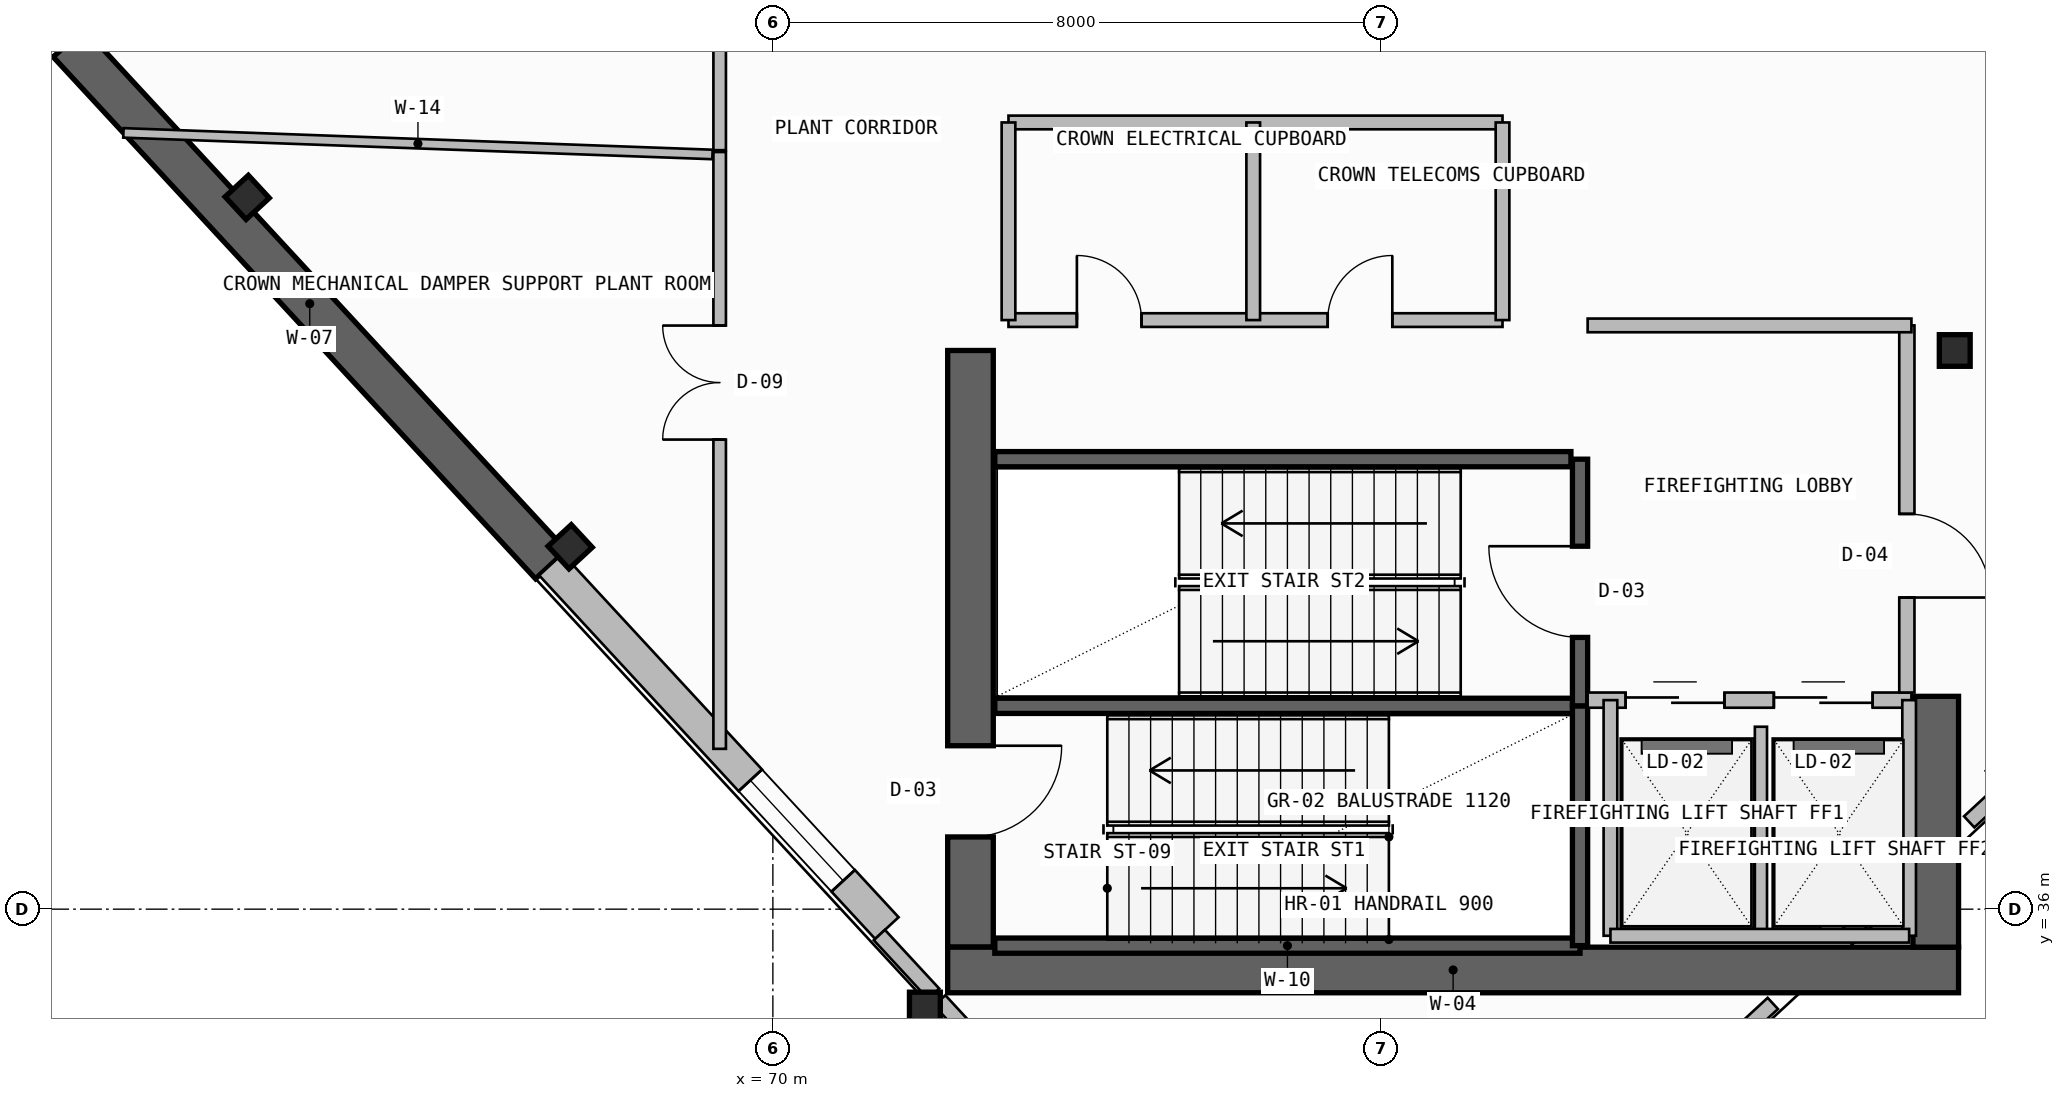
"""IFC4 building model, lengths in metres.
Left out: names, types, materials, properties, quantities, classifications, styles, units other than length and angle.
Written with IfcOpenShell. Run it as: python <this file> out.ifc"""

import sys

from ifc_helpers import new_model, si_unit, direction, frame, frame_2d, origin, origin_2d, place, context, subcontext, project, spatial, polyline, rectangle, i_section, outline, extrude, element, fill, save


model = new_model("IFC4")
c1 = context("Model", 3, precision=1e-05, world=origin(), true_north=direction((0.0, 1.0)))
c2 = subcontext(c1, "Body", "Model", "MODEL_VIEW")
j1 = project(units=[si_unit("LENGTHUNIT", "METRE"), si_unit("PLANEANGLEUNIT", "RADIAN")], contexts=[c1])
p1 = place(None, origin())
s1 = spatial("IfcSite", under=j1, at=p1, CompositionType="ELEMENT")
p2 = place(p1, origin())
s2 = spatial("IfcBuilding", under=s1, at=p2, CompositionType="ELEMENT")
p3 = place(p2, frame((0.0, 0.0, 312.58)))
s3 = spatial("IfcBuildingStorey", under=s2, at=p3, CompositionType="ELEMENT", Elevation=312.58)
p4 = place(p3, frame((72.6, 35.5, -0.2), z_axis=(0.0, 0.0, 1.0), x_axis=(0.0, 1.0, 0.0)))
e1 = element("IfcWall", 1, at=p4, inside=s3, PredefinedType="SHEAR", context=c2, shape_type="SweptSolid", body=[
    extrude(rectangle(XDim=7.85, YDim=0.6, at=frame_2d((3.925, 0.0))), origin(), (0.0, 0.0, 1.0), 4.8),
])
p5 = place(p4, frame((1.45, 0.0, 0.2)))
e2 = element("IfcOpeningElement", 2, at=p5, cuts=e1, PredefinedType="OPENING", context=c2, shape_type="SweptSolid", body=[
    extrude(rectangle(XDim=1.2, YDim=2.2, at=frame_2d((0.6, 1.1))), frame((0.0, 0.31, 0.0), z_axis=(0.0, -1.0, 0.0), x_axis=(1.0, 0.0, 0.0)), (0.0, 0.0, 1.0), 0.62),
])
p6 = place(p3, frame((72.3, 35.2, -0.2), z_axis=(0.0, 0.0, 1.0), x_axis=(1.0, 0.0, 0.0)))
e3 = element("IfcWall", 3, at=p6, inside=s3, PredefinedType="SHEAR", context=c2, shape_type="SweptSolid", body=[
    extrude(rectangle(XDim=13.3, YDim=0.6, at=frame_2d((6.65, 0.0))), origin(), (0.0, 0.0, 1.0), 4.8),
])
p7 = place(p3, frame((85.3, 35.5, -0.2), z_axis=(0.0, 0.0, 1.0), x_axis=(0.0, 1.0, 0.0)))
e4 = element("IfcWall", 4, at=p7, inside=s3, PredefinedType="SHEAR", context=c2, shape_type="SweptSolid", body=[
    extrude(rectangle(XDim=3.3, YDim=0.6, at=frame_2d((1.65, 0.0))), origin(), (0.0, 0.0, 1.0), 4.8),
])
for number, where, z_axis, x_axis in (
    (5, (72.0, 34.7, 0.0), (0.0, 0.0, 1.0), (1.0, 0.0, 0.0)),
    (6, (85.55, 43.35, 0.0), (0.0, 0.0, 1.0), (1.0, 0.0, 0.0)),
    (7, (63.084, 45.364, 0.0), (0.0, 0.0, 1.0), (-0.679, 0.734, 0.0)),
    (8, (67.333, 40.768, 0.0), (0.0, 0.0, 1.0), (-0.679, 0.734, 0.0)),
):
    element("IfcColumn", number, at=place(p3, frame(where, z_axis=z_axis, x_axis=x_axis)), inside=s3, PredefinedType="COLUMN", context=c2, shape_type="SweptSolid", body=[
        extrude(i_section(OverallWidth=0.406, OverallDepth=0.416, WebThickness=0.03, FlangeThickness=0.048, FilletRadius=0.015, at=origin_2d()), origin(), (0.0, 0.0, 1.0), 4.8),
    ])
p8 = place(p3, frame((54.805, 53.812, -0.2), z_axis=(0.0, 0.0, 1.0), x_axis=(0.678803115619, -0.734320318543, 0.0)))
e9 = element("IfcWall", 9, at=p8, inside=s3, PredefinedType="SHEAR", context=c2, shape_type="SweptSolid", body=[
    extrude(outline(polyline([(0.0, 0.0), (18.083, 0.0), (18.083, 4.8), (0.0, 3.755), (0.0, 0.0)])), frame((0.0, 0.275, 0.0), z_axis=(0.0, -1.0, 0.0), x_axis=(1.0, 0.0, 0.0)), (0.0, 0.0, 1.0), 0.55),
])
p9 = place(p8, frame((6.934, 0.0, 0.7)))
e10 = element("IfcOpeningElement", 10, at=p9, cuts=e9, PredefinedType="OPENING", context=c2, shape_type="SweptSolid", body=[
    extrude(rectangle(XDim=1.8, YDim=1.2, at=frame_2d((0.9, 0.6))), frame((0.0, 0.285, 0.0), z_axis=(0.0, -1.0, 0.0), x_axis=(1.0, 0.0, 0.0)), (0.0, 0.0, 1.0), 0.57),
])
p10 = place(p3, frame((67.08, 40.533, 0.0), z_axis=(0.0, 0.0, 1.0), x_axis=(0.678800006437, -0.734323192648, 0.0)))
e11 = element("IfcWall", 11, at=p10, inside=s3, PredefinedType="SOLIDWALL", context=c2, shape_type="SweptSolid", body=[
    extrude(outline(polyline([(0.0, 0.0), (6.512, 0.0), (6.512, 4.6), (0.0, 4.6), (0.0, 0.0)])), frame((0.0, 0.21, 0.0), z_axis=(0.0, -1.0, 0.0), x_axis=(1.0, 0.0, 0.0)), (0.0, 0.0, 1.0), 0.42),
])
p11 = place(p10, frame((3.865, 0.0, 0.7)))
e12 = element("IfcOpeningElement", 12, at=p11, cuts=e11, PredefinedType="OPENING", context=c2, shape_type="SweptSolid", body=[
    extrude(rectangle(XDim=1.8, YDim=1.2, at=frame_2d((0.9, 0.6))), frame((0.0, 0.22, 0.0), z_axis=(0.0, -1.0, 0.0), x_axis=(1.0, 0.0, 0.0)), (0.0, 0.0, 1.0), 0.44),
])
p12 = place(p3, frame((72.881, 34.058, 0.0), z_axis=(0.0, 0.0, 1.0), x_axis=(-0.678872530156, 0.734256145905, 0.0)))
e13 = element("IfcWall", 13, at=p12, inside=s3, PredefinedType="PARAPET", context=c2, shape_type="SweptSolid", body=[
    extrude(rectangle(XDim=1.01, YDim=0.2, at=frame_2d((0.505, 0.0))), origin(), (0.0, 0.0, 1.0), 1.15),
])
p13 = place(p3, frame((72.115, 34.887, 0.0), z_axis=(0.0, 0.0, 1.0), x_axis=(-0.678713667452, 0.734402994012, 0.0)))
e14 = element("IfcWall", 14, at=p13, inside=s3, PredefinedType="PARAPET", context=c2, shape_type="SweptSolid", body=[
    extrude(rectangle(XDim=1.052, YDim=0.2, at=frame_2d((0.526, 0.0))), origin(), (0.0, 0.0, 1.0), 1.15),
])
p14 = place(p3, frame((86.192, 37.566, 0.0), z_axis=(0.0, 0.0, 1.0), x_axis=(-0.734346728958, -0.678774544064, 0.0)))
e15 = element("IfcWall", 15, at=p14, inside=s3, PredefinedType="PARAPET", context=c2, shape_type="SweptSolid", body=[
    extrude(rectangle(XDim=0.615, YDim=0.2, at=frame_2d((0.308, 0.0))), origin(), (0.0, 0.0, 1.0), 1.15),
])
p15 = place(p3, frame((84.86, 36.335, 0.0), z_axis=(0.0, 0.0, 1.0), x_axis=(-0.734337093013, -0.678784968768, 0.0)))
e16 = element("IfcWall", 16, at=p15, inside=s3, PredefinedType="PARAPET", context=c2, shape_type="SweptSolid", body=[
    extrude(rectangle(XDim=1.024, YDim=0.2, at=frame_2d((0.512, 0.0))), origin(), (0.0, 0.0, 1.0), 1.15),
])
p16 = place(p3, frame((83.156, 34.76, 0.0), z_axis=(0.0, 0.0, 1.0), x_axis=(-0.734364355784, -0.678755473609, 0.0)))
e17 = element("IfcWall", 17, at=p16, inside=s3, PredefinedType="PARAPET", context=c2, shape_type="SweptSolid", body=[
    extrude(rectangle(XDim=1.045, YDim=0.2, at=frame_2d((0.522, 0.0))), origin(), (0.0, 0.0, 1.0), 1.15),
])
for number, where, z_axis, x_axis in (
    (18, (72.92, 35.52, -0.2), (0.0, 0.0, 1.0), (1.0, 0.0, 0.0)),
    (19, (72.92, 38.675, -0.2), (0.0, 0.0, 1.0), (1.0, 0.0, 0.0)),
):
    element("IfcWall", number, at=place(p3, frame(where, z_axis=z_axis, x_axis=x_axis)), inside=s3, PredefinedType="SOLIDWALL", context=c2, shape_type="SweptSolid", body=[
        extrude(rectangle(XDim=7.7, YDim=0.2, at=frame_2d((3.85, 0.0))), origin(), (0.0, 0.0, 1.0), 4.8),
    ])
p17 = place(p3, frame((80.62, 35.52, -0.2), z_axis=(0.0, 0.0, 1.0), x_axis=(0.0, 1.0, 0.0)))
e20 = element("IfcWall", 20, at=p17, inside=s3, PredefinedType="SOLIDWALL", context=c2, shape_type="SweptSolid", body=[
    extrude(rectangle(XDim=3.155, YDim=0.2, at=frame_2d((1.578, 0.0))), origin(), (0.0, 0.0, 1.0), 4.8),
])
p18 = place(p3, frame((80.62, 38.675, -0.2), z_axis=(0.0, 0.0, 1.0), x_axis=(0.0, 1.0, 0.0)))
e21 = element("IfcWall", 21, at=p18, inside=s3, PredefinedType="SOLIDWALL", context=c2, shape_type="SweptSolid", body=[
    extrude(rectangle(XDim=3.245, YDim=0.2, at=frame_2d((1.623, 0.0))), origin(), (0.0, 0.0, 1.0), 4.8),
])
p19 = place(p18, frame((0.9, 0.0, 0.2)))
e22 = element("IfcOpeningElement", 22, at=p19, cuts=e21, PredefinedType="OPENING", context=c2, shape_type="SweptSolid", body=[
    extrude(rectangle(XDim=1.2, YDim=2.2, at=frame_2d((0.6, 1.1))), frame((0.0, 0.11, 0.0), z_axis=(0.0, -1.0, 0.0), x_axis=(1.0, 0.0, 0.0)), (0.0, 0.0, 1.0), 0.22),
])
p20 = place(p3, frame((80.72, 38.75, 0.0), z_axis=(0.0, 0.0, 1.0), x_axis=(1.0, 0.0, 0.0)))
e23 = element("IfcWall", 23, at=p20, inside=s3, PredefinedType="SOLIDWALL", context=c2, shape_type="SweptSolid", body=[
    extrude(rectangle(XDim=4.26, YDim=0.2, at=frame_2d((2.13, 0.0))), origin(), (0.0, 0.0, 1.0), 4.6),
])
p21 = place(p20, frame((0.5, 0.0, 0.0)))
e24 = element("IfcOpeningElement", 24, at=p21, cuts=e23, PredefinedType="OPENING", context=c2, shape_type="SweptSolid", body=[
    extrude(rectangle(XDim=1.3, YDim=2.3, at=frame_2d((0.65, 1.15))), frame((0.0, 0.11, 0.0), z_axis=(0.0, -1.0, 0.0), x_axis=(1.0, 0.0, 0.0)), (0.0, 0.0, 1.0), 0.22),
])
p22 = place(p20, frame((2.45, 0.0, 0.0)))
e25 = element("IfcOpeningElement", 25, at=p22, cuts=e23, PredefinedType="OPENING", context=c2, shape_type="SweptSolid", body=[
    extrude(rectangle(XDim=1.3, YDim=2.3, at=frame_2d((0.65, 1.15))), frame((0.0, 0.11, 0.0), z_axis=(0.0, -1.0, 0.0), x_axis=(1.0, 0.0, 0.0)), (0.0, 0.0, 1.0), 0.22),
])
p23 = place(p3, frame((83.0, 35.65, 0.0), z_axis=(0.0, 0.0, 1.0), x_axis=(0.0, 1.0, 0.0)))
e26 = element("IfcWall", 26, at=p23, inside=s3, PredefinedType="PLUMBINGWALL", context=c2, shape_type="SweptSolid", body=[
    extrude(rectangle(XDim=2.75, YDim=0.16, at=frame_2d((1.375, 0.0))), origin(), (0.0, 0.0, 1.0), 4.6),
])
for number, where, z_axis, x_axis in (
    (27, (84.95, 35.65, 0.0), (0.0, 0.0, 1.0), (0.0, 1.0, 0.0)),
    (28, (81.02, 35.65, 0.0), (0.0, 0.0, 1.0), (0.0, 1.0, 0.0)),
):
    element("IfcWall", number, at=place(p3, frame(where, z_axis=z_axis, x_axis=x_axis)), inside=s3, PredefinedType="SOLIDWALL", context=c2, shape_type="SweptSolid", body=[
        extrude(rectangle(XDim=3.1, YDim=0.18, at=frame_2d((1.55, 0.0))), origin(), (0.0, 0.0, 1.0), 4.6),
    ])
p24 = place(p3, frame((81.02, 35.65, 0.0), z_axis=(0.0, 0.0, 1.0), x_axis=(1.0, 0.0, 0.0)))
e29 = element("IfcWall", 29, at=p24, inside=s3, PredefinedType="SOLIDWALL", context=c2, shape_type="SweptSolid", body=[
    extrude(rectangle(XDim=3.93, YDim=0.18, at=frame_2d((1.965, 0.0))), origin(), (0.0, 0.0, 1.0), 4.6),
])
p25 = place(p3, frame((84.92, 38.85, 0.0), z_axis=(0.0, 0.0, 1.0), x_axis=(0.0, 1.0, 0.0)))
e30 = element("IfcWall", 30, at=p25, inside=s3, PredefinedType="SOLIDWALL", context=c2, shape_type="SweptSolid", body=[
    extrude(rectangle(XDim=4.83, YDim=0.2, at=frame_2d((2.415, 0.0))), origin(), (0.0, 0.0, 1.0), 4.6),
])
p26 = place(p25, frame((1.25, 0.0, 0.0)))
e31 = element("IfcOpeningElement", 31, at=p26, cuts=e30, PredefinedType="OPENING", context=c2, shape_type="SweptSolid", body=[
    extrude(rectangle(XDim=1.1, YDim=2.2, at=frame_2d((0.55, 1.1))), frame((0.0, 0.11, 0.0), z_axis=(0.0, -1.0, 0.0), x_axis=(1.0, 0.0, 0.0)), (0.0, 0.0, 1.0), 0.22),
])
p27 = place(p3, frame((72.92, 41.92, -0.2), z_axis=(0.0, 0.0, 1.0), x_axis=(1.0, 0.0, 0.0)))
e32 = element("IfcWall", 32, at=p27, inside=s3, PredefinedType="SOLIDWALL", context=c2, shape_type="SweptSolid", body=[
    extrude(rectangle(XDim=7.58, YDim=0.2, at=frame_2d((3.79, 0.0))), origin(), (0.0, 0.0, 1.0), 4.8),
])
p28 = place(p3, frame((80.72, 43.68, 0.0), z_axis=(0.0, 0.0, 1.0), x_axis=(1.0, 0.0, 0.0)))
e33 = element("IfcWall", 33, at=p28, inside=s3, PredefinedType="SOLIDWALL", context=c2, shape_type="SweptSolid", body=[
    extrude(rectangle(XDim=4.26, YDim=0.18, at=frame_2d((2.13, 0.0))), origin(), (0.0, 0.0, 1.0), 4.6),
])
p29 = place(p3, frame((73.1, 43.75, 0.0), z_axis=(0.0, 0.0, 1.0), x_axis=(1.0, 0.0, 0.0)))
e34 = element("IfcWall", 34, at=p29, inside=s3, PredefinedType="PLUMBINGWALL", context=c2, shape_type="SweptSolid", body=[
    extrude(rectangle(XDim=6.5, YDim=0.18, at=frame_2d((3.25, 0.0))), origin(), (0.0, 0.0, 1.0), 4.6),
])
p30 = place(p29, frame((0.9, 0.0, 0.0)))
e35 = element("IfcOpeningElement", 35, at=p30, cuts=e34, PredefinedType="OPENING", context=c2, shape_type="SweptSolid", body=[
    extrude(rectangle(XDim=0.85, YDim=2.05, at=frame_2d((0.425, 1.025))), frame((0.0, 0.1, 0.0), z_axis=(0.0, -1.0, 0.0), x_axis=(1.0, 0.0, 0.0)), (0.0, 0.0, 1.0), 0.2),
])
p31 = place(p29, frame((4.2, 0.0, 0.0)))
e36 = element("IfcOpeningElement", 36, at=p31, cuts=e34, PredefinedType="OPENING", context=c2, shape_type="SweptSolid", body=[
    extrude(rectangle(XDim=0.85, YDim=2.05, at=frame_2d((0.425, 1.025))), frame((0.0, 0.1, 0.0), z_axis=(0.0, -1.0, 0.0), x_axis=(1.0, 0.0, 0.0)), (0.0, 0.0, 1.0), 0.2),
])
p32 = place(p3, frame((73.1, 46.35, 0.0), z_axis=(0.0, 0.0, 1.0), x_axis=(1.0, 0.0, 0.0)))
e37 = element("IfcWall", 37, at=p32, inside=s3, PredefinedType="PLUMBINGWALL", context=c2, shape_type="SweptSolid", body=[
    extrude(rectangle(XDim=6.5, YDim=0.18, at=frame_2d((3.25, 0.0))), origin(), (0.0, 0.0, 1.0), 4.6),
])
for number, where, z_axis, x_axis in (
    (38, (73.1, 43.75, 0.0), (0.0, 0.0, 1.0), (0.0, 1.0, 0.0)),
    (39, (79.6, 43.75, 0.0), (0.0, 0.0, 1.0), (0.0, 1.0, 0.0)),
    (40, (76.32, 43.75, 0.0), (0.0, 0.0, 1.0), (0.0, 1.0, 0.0)),
):
    element("IfcWall", number, at=place(p3, frame(where, z_axis=z_axis, x_axis=x_axis)), inside=s3, PredefinedType="PLUMBINGWALL", context=c2, shape_type="SweptSolid", body=[
        extrude(rectangle(XDim=2.6, YDim=0.18, at=frame_2d((1.3, 0.0))), origin(), (0.0, 0.0, 1.0), 4.6),
    ])
p33 = place(p3, frame((69.3, 45.961, 0.0), z_axis=(0.0, 0.0, 1.0), x_axis=(0.0, -1.0, 0.0)))
e41 = element("IfcWall", 41, at=p33, inside=s3, PredefinedType="PARTITIONING", context=c2, shape_type="SweptSolid", body=[
    extrude(rectangle(XDim=7.852, YDim=0.165, at=frame_2d((3.926, 0.0))), origin(), (0.0, 0.0, 1.0), 4.6),
])
p34 = place(p33, frame((2.283, 0.0, 0.0)))
e42 = element("IfcOpeningElement", 42, at=p34, cuts=e41, PredefinedType="OPENING", context=c2, shape_type="SweptSolid", body=[
    extrude(rectangle(XDim=1.5, YDim=2.25, at=frame_2d((0.75, 1.125))), frame((0.0, 0.093, 0.0), z_axis=(0.0, -1.0, 0.0), x_axis=(1.0, 0.0, 0.0)), (0.0, 0.0, 1.0), 0.185),
])
p35 = place(p3, frame((61.455, 46.213, 0.0), z_axis=(0.0, 0.0, 1.0), x_axis=(0.999328477897, -0.036641414612, 0.0)))
e43 = element("IfcWall", 43, at=p35, inside=s3, PredefinedType="PARTITIONING", context=c2, shape_type="SweptSolid", body=[
    extrude(rectangle(XDim=7.756, YDim=0.125, at=frame_2d((3.878, 0.0))), origin(), (0.0, 0.0, 1.0), 4.6),
])
p36 = place(p3, frame((69.3, 48.456, 0.0), z_axis=(0.0, 0.0, 1.0), x_axis=(0.0, -1.0, 0.0)))
e44 = element("IfcWall", 44, at=p36, inside=s3, PredefinedType="PARTITIONING", context=c2, shape_type="SweptSolid", body=[
    extrude(rectangle(XDim=2.47, YDim=0.165, at=frame_2d((1.235, 0.0))), origin(), (0.0, 0.0, 1.0), 2.12),
])
p37 = place(p11, origin())
e45 = element("IfcWindow", 45, at=p37, inside=s3, PartitioningType="SINGLE_PANEL", PredefinedType="WINDOW", context=c2, shape_type="SweptSolid", body=[
    extrude(rectangle(XDim=1.8, YDim=1.2, at=frame_2d((0.9, 0.6))), frame((0.0, 0.03, 0.0), z_axis=(0.0, -1.0, 0.0), x_axis=(1.0, 0.0, 0.0)), (0.0, 0.0, 1.0), 0.06),
])
fill(e12, e45)
p38 = place(p5, frame((1.2, 0.0, 0.0), z_axis=(0.0, 0.0, 1.0), x_axis=(-1.0, 0.0, 0.0)))
e46 = element("IfcDoor", 46, at=p38, inside=s3, OperationType="SINGLE_SWING_LEFT", PredefinedType="USERDEFINED", context=c2, shape_type="SweptSolid", body=[
    extrude(rectangle(XDim=1.2, YDim=2.2, at=frame_2d((0.6, 1.1))), frame((0.0, 0.025, 0.0), z_axis=(0.0, -1.0, 0.0), x_axis=(1.0, 0.0, 0.0)), (0.0, 0.0, 1.0), 0.05),
])
fill(e2, e46)
p39 = place(p19, origin())
e47 = element("IfcDoor", 47, at=p39, inside=s3, OperationType="SINGLE_SWING_RIGHT", PredefinedType="USERDEFINED", context=c2, shape_type="SweptSolid", body=[
    extrude(rectangle(XDim=1.2, YDim=2.2, at=frame_2d((0.6, 1.1))), frame((0.0, 0.025, 0.0), z_axis=(0.0, -1.0, 0.0), x_axis=(1.0, 0.0, 0.0)), (0.0, 0.0, 1.0), 0.05),
])
fill(e22, e47)
p40 = place(p21, origin())
e48 = element("IfcDoor", 48, at=p40, inside=s3, OperationType="DOUBLE_DOOR_SLIDING", PredefinedType="DOOR", context=c2, shape_type="SweptSolid", body=[
    extrude(rectangle(XDim=1.3, YDim=2.3, at=frame_2d((0.65, 1.15))), frame((0.0, 0.025, 0.0), z_axis=(0.0, -1.0, 0.0), x_axis=(1.0, 0.0, 0.0)), (0.0, 0.0, 1.0), 0.05),
])
fill(e24, e48)
p41 = place(p22, origin())
e49 = element("IfcDoor", 49, at=p41, inside=s3, OperationType="DOUBLE_DOOR_SLIDING", PredefinedType="DOOR", context=c2, shape_type="SweptSolid", body=[
    extrude(rectangle(XDim=1.3, YDim=2.3, at=frame_2d((0.65, 1.15))), frame((0.0, 0.025, 0.0), z_axis=(0.0, -1.0, 0.0), x_axis=(1.0, 0.0, 0.0)), (0.0, 0.0, 1.0), 0.05),
])
fill(e25, e49)
p42 = place(p26, frame((1.1, 0.0, 0.0), z_axis=(0.0, 0.0, 1.0), x_axis=(-1.0, 0.0, 0.0)))
e50 = element("IfcDoor", 50, at=p42, inside=s3, OperationType="SINGLE_SWING_RIGHT", PredefinedType="DOOR", context=c2, shape_type="SweptSolid", body=[
    extrude(rectangle(XDim=1.1, YDim=2.2, at=frame_2d((0.55, 1.1))), frame((0.0, 0.025, 0.0), z_axis=(0.0, -1.0, 0.0), x_axis=(1.0, 0.0, 0.0)), (0.0, 0.0, 1.0), 0.05),
])
fill(e31, e50)
p43 = place(p30, origin())
e51 = element("IfcDoor", 51, at=p43, inside=s3, OperationType="SINGLE_SWING_LEFT", PredefinedType="DOOR", context=c2, shape_type="SweptSolid", body=[
    extrude(rectangle(XDim=0.85, YDim=2.05, at=frame_2d((0.425, 1.025))), frame((0.0, 0.025, 0.0), z_axis=(0.0, -1.0, 0.0), x_axis=(1.0, 0.0, 0.0)), (0.0, 0.0, 1.0), 0.05),
])
fill(e35, e51)
p44 = place(p31, origin())
e52 = element("IfcDoor", 52, at=p44, inside=s3, OperationType="SINGLE_SWING_RIGHT", PredefinedType="DOOR", context=c2, shape_type="SweptSolid", body=[
    extrude(rectangle(XDim=0.85, YDim=2.05, at=frame_2d((0.425, 1.025))), frame((0.0, 0.025, 0.0), z_axis=(0.0, -1.0, 0.0), x_axis=(1.0, 0.0, 0.0)), (0.0, 0.0, 1.0), 0.05),
])
fill(e36, e52)
p45 = place(p34, frame((1.5, 0.0, 0.0), z_axis=(0.0, 0.0, 1.0), x_axis=(-1.0, 0.0, 0.0)))
e53 = element("IfcDoor", 53, at=p45, inside=s3, OperationType="DOUBLE_DOOR_SINGLE_SWING", PredefinedType="DOOR", context=c2, shape_type="SweptSolid", body=[
    extrude(rectangle(XDim=1.5, YDim=2.25, at=frame_2d((0.75, 1.125))), frame((0.0, 0.025, 0.0), z_axis=(0.0, -1.0, 0.0), x_axis=(1.0, 0.0, 0.0)), (0.0, 0.0, 1.0), 0.05),
])
fill(e42, e53)
save(model, sys.argv[1])
